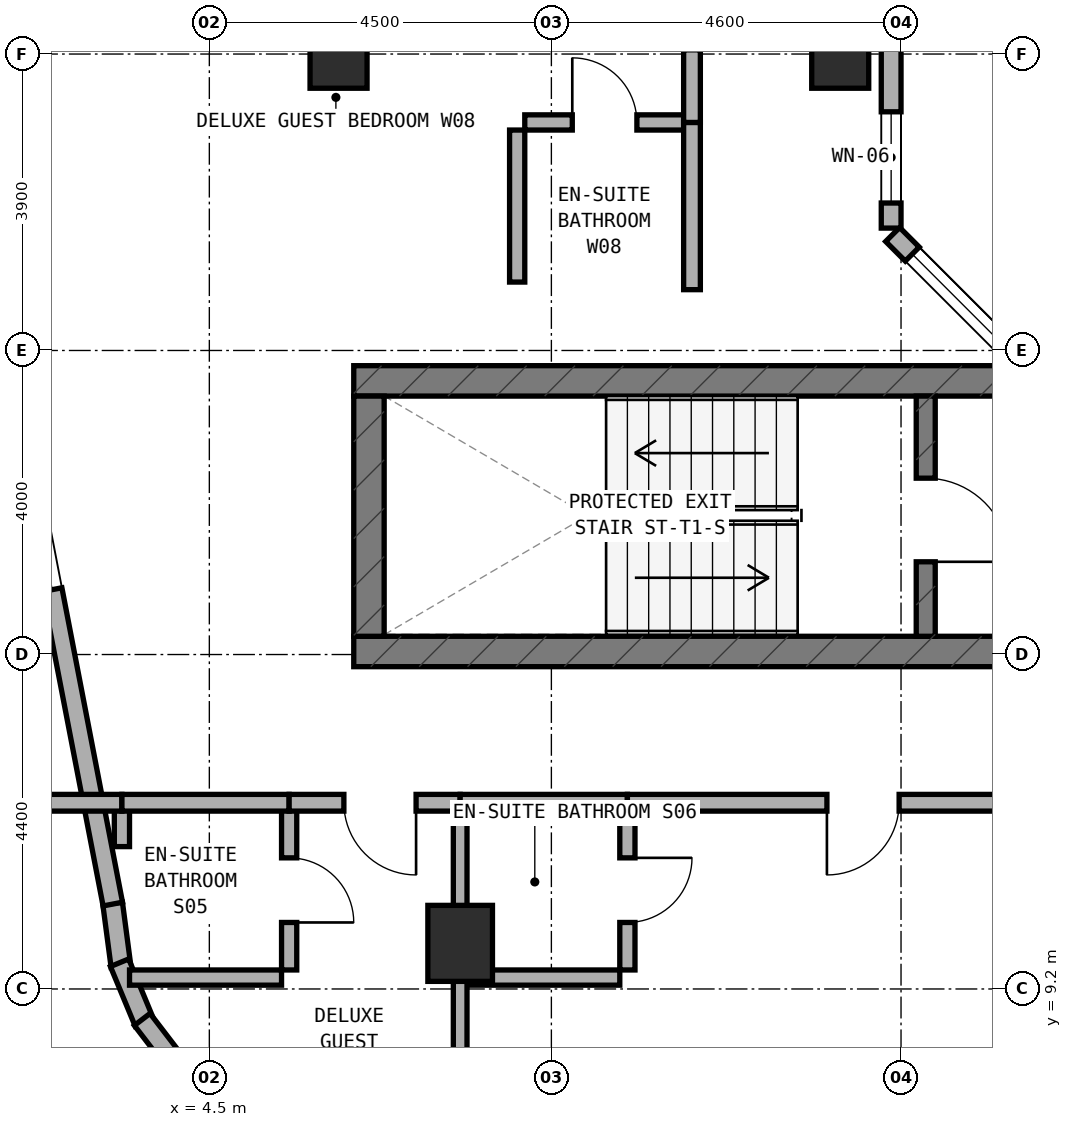
"""IFC4 building model, lengths in metres.
Left out: names, types, materials, properties, quantities, classifications, styles, units other than length and angle.
Written with IfcOpenShell. Run it as: python <this file> out.ifc"""

import sys

from ifc_helpers import new_model, si_unit, direction, frame, frame_2d, origin, origin_2d, place, context, subcontext, project, spatial, rectangle, extrude, element, fill, save


model = new_model("IFC4")
c1 = context("Model", 3, precision=1e-05, world=origin(), true_north=direction((0.0, 1.0)))
c2 = subcontext(c1, "Body", "Model", "MODEL_VIEW")
j1 = project(units=[si_unit("LENGTHUNIT", "METRE"), si_unit("PLANEANGLEUNIT", "RADIAN")], contexts=[c1])
p1 = place(None, origin())
s1 = spatial("IfcSite", under=j1, at=p1, CompositionType="ELEMENT")
p2 = place(p1, origin())
s2 = spatial("IfcBuilding", under=s1, at=p2, CompositionType="ELEMENT")
p3 = place(p2, frame((0.0, 0.0, 177.5)))
s3 = spatial("IfcBuildingStorey", under=s2, at=p3, CompositionType="ELEMENT", Elevation=177.5)
p4 = place(p3, frame((6.4, 13.64, 0.0), z_axis=(0.0, 0.0, 1.0), x_axis=(1.0, 0.0, 0.0)))
e1 = element("IfcWall", 1, at=p4, inside=s3, PredefinedType="SHEAR", context=c2, shape_type="SweptSolid", body=[
    extrude(rectangle(XDim=24.4, YDim=0.4, at=frame_2d((12.2, 0.0))), origin(), (0.0, 0.0, 1.0), 3.6),
])
p5 = place(p4, frame((9.15, 0.0, 0.0)))
e2 = element("IfcOpeningElement", 2, at=p5, cuts=e1, PredefinedType="OPENING", context=c2, shape_type="SweptSolid", body=[
    extrude(rectangle(XDim=1.2, YDim=2.15, at=frame_2d((0.6, 1.075))), frame((0.0, 0.21, 0.0), z_axis=(0.0, -1.0, 0.0), x_axis=(1.0, 0.0, 0.0)), (0.0, 0.0, 1.0), 0.42),
])
p6 = place(p4, frame((16.94, 0.0, 0.0)))
e3 = element("IfcOpeningElement", 3, at=p6, cuts=e1, PredefinedType="OPENING", context=c2, shape_type="SweptSolid", body=[
    extrude(rectangle(XDim=0.85, YDim=2.1, at=frame_2d((0.425, 1.05))), frame((0.0, 0.21, 0.0), z_axis=(0.0, -1.0, 0.0), x_axis=(1.0, 0.0, 0.0)), (0.0, 0.0, 1.0), 0.42),
])
p7 = place(p4, frame((18.783, 0.0, 0.0)))
e4 = element("IfcOpeningElement", 4, at=p7, cuts=e1, PredefinedType="OPENING", context=c2, shape_type="SweptSolid", body=[
    extrude(rectangle(XDim=1.1, YDim=2.15, at=frame_2d((0.55, 1.075))), frame((0.0, 0.21, 0.0), z_axis=(0.0, -1.0, 0.0), x_axis=(1.0, 0.0, 0.0)), (0.0, 0.0, 1.0), 0.42),
])
p8 = place(p4, frame((20.65, 0.0, 0.0)))
e5 = element("IfcOpeningElement", 5, at=p8, cuts=e1, PredefinedType="OPENING", context=c2, shape_type="SweptSolid", body=[
    extrude(rectangle(XDim=1.1, YDim=2.15, at=frame_2d((0.55, 1.075))), frame((0.0, 0.21, 0.0), z_axis=(0.0, -1.0, 0.0), x_axis=(1.0, 0.0, 0.0)), (0.0, 0.0, 1.0), 0.42),
])
p9 = place(p4, frame((22.517, 0.0, 0.0)))
e6 = element("IfcOpeningElement", 6, at=p9, cuts=e1, PredefinedType="OPENING", context=c2, shape_type="SweptSolid", body=[
    extrude(rectangle(XDim=1.1, YDim=2.15, at=frame_2d((0.55, 1.075))), frame((0.0, 0.21, 0.0), z_axis=(0.0, -1.0, 0.0), x_axis=(1.0, 0.0, 0.0)), (0.0, 0.0, 1.0), 0.42),
])
p10 = place(p3, frame((6.4, 17.2, 0.0), z_axis=(0.0, 0.0, 1.0), x_axis=(1.0, 0.0, 0.0)))
e7 = element("IfcWall", 7, at=p10, inside=s3, PredefinedType="SHEAR", context=c2, shape_type="SweptSolid", body=[
    extrude(rectangle(XDim=24.4, YDim=0.4, at=frame_2d((12.2, 0.0))), origin(), (0.0, 0.0, 1.0), 3.6),
])
p11 = place(p3, frame((6.6, 13.84, 0.0), z_axis=(0.0, 0.0, 1.0), x_axis=(0.0, 1.0, 0.0)))
e8 = element("IfcWall", 8, at=p11, inside=s3, PredefinedType="SHEAR", context=c2, shape_type="SweptSolid", body=[
    extrude(rectangle(XDim=3.16, YDim=0.4, at=frame_2d((1.58, 0.0))), origin(), (0.0, 0.0, 1.0), 3.6),
])
p12 = place(p3, frame((13.925, 13.84, 0.0), z_axis=(0.0, 0.0, 1.0), x_axis=(0.0, 1.0, 0.0)))
e9 = element("IfcWall", 9, at=p12, inside=s3, PredefinedType="STANDARD", context=c2, shape_type="SweptSolid", body=[
    extrude(rectangle(XDim=3.16, YDim=0.25, at=frame_2d((1.58, 0.0))), origin(), (0.0, 0.0, 1.0), 3.32),
])
p13 = place(p12, frame((0.98, 0.0, 0.0)))
e10 = element("IfcOpeningElement", 10, at=p13, cuts=e9, PredefinedType="OPENING", context=c2, shape_type="SweptSolid", body=[
    extrude(rectangle(XDim=1.1, YDim=2.15, at=frame_2d((0.55, 1.075))), frame((0.0, 0.135, 0.0), z_axis=(0.0, -1.0, 0.0), x_axis=(1.0, 0.0, 0.0)), (0.0, 0.0, 1.0), 0.27),
])
p14 = place(p3, frame((6.2, 21.5, 0.0), z_axis=(0.0, 0.0, 1.0), x_axis=(1.0, 0.0, 0.0)))
e11 = element("IfcColumn", 11, at=p14, inside=s3, PredefinedType="COLUMN", context=c2, shape_type="SweptSolid", body=[
    extrude(rectangle(XDim=0.75, YDim=0.9, at=origin_2d()), origin(), (0.0, 0.0, 1.0), 3.6),
])
p15 = place(p3, frame((7.8, 9.8, 0.0), z_axis=(0.0, 0.0, 1.0), x_axis=(1.0, 0.0, 0.0)))
e12 = element("IfcColumn", 12, at=p15, inside=s3, PredefinedType="COLUMN", context=c2, shape_type="SweptSolid", body=[
    extrude(rectangle(XDim=0.85, YDim=1.0, at=origin_2d()), origin(), (0.0, 0.0, 1.0), 3.6),
])
p16 = place(p3, frame((12.8, 21.5, 0.0), z_axis=(0.0, 0.0, 1.0), x_axis=(1.0, 0.0, 0.0)))
e13 = element("IfcColumn", 13, at=p16, inside=s3, PredefinedType="COLUMN", context=c2, shape_type="SweptSolid", body=[
    extrude(rectangle(XDim=0.75, YDim=0.9, at=origin_2d()), origin(), (0.0, 0.0, 1.0), 3.6),
])
p17 = place(p3, frame((3.228, 10.325, 0.0), z_axis=(0.0, 0.0, 1.0), x_axis=(0.130704676564, -0.99142134712, 0.0)))
e14 = element("IfcWall", 14, at=p17, inside=s3, PredefinedType="STANDARD", context=c2, shape_type="SweptSolid", body=[
    extrude(rectangle(XDim=0.833, YDim=0.26, at=frame_2d((0.417, 0.0))), origin(), (0.0, 0.0, 1.0), 3.32),
])
p18 = place(p3, frame((3.319, 9.545, 0.0), z_axis=(0.0, 0.0, 1.0), x_axis=(0.383086687796, -0.923712395518, 0.0)))
e15 = element("IfcWall", 15, at=p18, inside=s3, PredefinedType="STANDARD", context=c2, shape_type="SweptSolid", body=[
    extrude(rectangle(XDim=0.851, YDim=0.26, at=frame_2d((0.425, 0.0))), origin(), (0.0, 0.0, 1.0), 3.32),
])
p19 = place(p3, frame((3.617, 8.799, 0.0), z_axis=(0.0, 0.0, 1.0), x_axis=(0.608099977432, -0.793860452124, 0.0)))
e16 = element("IfcWall", 16, at=p19, inside=s3, PredefinedType="STANDARD", context=c2, shape_type="SweptSolid", body=[
    extrude(rectangle(XDim=0.85, YDim=0.26, at=frame_2d((0.425, 0.0))), origin(), (0.0, 0.0, 1.0), 3.32),
])
p20 = place(p3, frame((15.278, 17.338, 0.0), z_axis=(0.0, 0.0, 1.0), x_axis=(-0.707106781187, 0.707106781187, 0.0)))
e17 = element("IfcWall", 17, at=p20, inside=s3, PredefinedType="STANDARD", context=c2, shape_type="SweptSolid", body=[
    extrude(rectangle(XDim=2.529, YDim=0.26, at=frame_2d((1.264, 0.0))), origin(), (0.0, 0.0, 1.0), 3.32),
])
p21 = place(p20, frame((0.364, 0.0, 0.85)))
e18 = element("IfcOpeningElement", 18, at=p21, cuts=e17, PredefinedType="OPENING", context=c2, shape_type="SweptSolid", body=[
    extrude(rectangle(XDim=1.8, YDim=1.5, at=frame_2d((0.9, 0.75))), frame((0.0, 0.14, 0.0), z_axis=(0.0, -1.0, 0.0), x_axis=(1.0, 0.0, 0.0)), (0.0, 0.0, 1.0), 0.28),
])
p22 = place(p3, frame((13.47, 19.21, 0.0), z_axis=(0.0, 0.0, 1.0), x_axis=(0.0, 1.0, 0.0)))
e19 = element("IfcWall", 19, at=p22, inside=s3, PredefinedType="STANDARD", context=c2, shape_type="SweptSolid", body=[
    extrude(rectangle(XDim=11.615, YDim=0.26, at=frame_2d((5.808, 0.0))), origin(), (0.0, 0.0, 1.0), 3.32),
])
p23 = place(p22, frame((0.33, 0.0, 0.5)))
e20 = element("IfcOpeningElement", 20, at=p23, cuts=e19, PredefinedType="OPENING", context=c2, shape_type="SweptSolid", body=[
    extrude(rectangle(XDim=1.2, YDim=1.9, at=frame_2d((0.6, 0.95))), frame((0.0, 0.14, 0.0), z_axis=(0.0, -1.0, 0.0), x_axis=(1.0, 0.0, 0.0)), (0.0, 0.0, 1.0), 0.28),
])
p24 = place(p22, frame((4.74, 0.0, 0.85)))
e21 = element("IfcOpeningElement", 21, at=p24, cuts=e19, PredefinedType="OPENING", context=c2, shape_type="SweptSolid", body=[
    extrude(rectangle(XDim=2.1, YDim=1.5, at=frame_2d((1.05, 0.75))), frame((0.0, 0.14, 0.0), z_axis=(0.0, -1.0, 0.0), x_axis=(1.0, 0.0, 0.0)), (0.0, 0.0, 1.0), 0.28),
])
p25 = place(p22, frame((10.067, 0.0, 0.5)))
e22 = element("IfcOpeningElement", 22, at=p25, cuts=e19, PredefinedType="OPENING", context=c2, shape_type="SweptSolid", body=[
    extrude(rectangle(XDim=1.2, YDim=1.9, at=frame_2d((0.6, 0.95))), frame((0.0, 0.14, 0.0), z_axis=(0.0, -1.0, 0.0), x_axis=(1.0, 0.0, 0.0)), (0.0, 0.0, 1.0), 0.28),
])
p26 = place(p3, frame((1.518, 19.199, 0.0), z_axis=(0.0, 0.0, 1.0), x_axis=(0.189254809039, -0.98192801022, 0.0)))
e23 = element("IfcWall", 23, at=p26, inside=s3, PredefinedType="STANDARD", context=c2, shape_type="SweptSolid", body=[
    extrude(rectangle(XDim=9.046, YDim=0.26, at=frame_2d((4.523, 0.0))), origin(), (0.0, 0.0, 1.0), 3.32),
])
p27 = place(p26, frame((2.733, 0.0, 0.85)))
e24 = element("IfcOpeningElement", 24, at=p27, cuts=e23, PredefinedType="OPENING", context=c2, shape_type="SweptSolid", body=[
    extrude(rectangle(XDim=2.1, YDim=1.5, at=frame_2d((1.05, 0.75))), frame((0.0, 0.14, 0.0), z_axis=(0.0, -1.0, 0.0), x_axis=(1.0, 0.0, 0.0)), (0.0, 0.0, 1.0), 0.28),
])
p28 = place(p3, frame((5.55, 9.45, 0.0), z_axis=(0.0, 0.0, 1.0), x_axis=(0.0, 1.0, 0.0)))
e25 = element("IfcWall", 25, at=p28, inside=s3, PredefinedType="PLUMBINGWALL", context=c2, shape_type="SweptSolid", body=[
    extrude(rectangle(XDim=2.1, YDim=0.2, at=frame_2d((1.05, 0.0))), origin(), (0.0, 0.0, 1.0), 3.32),
])
p29 = place(p28, frame((0.625, 0.0, 0.0)))
e26 = element("IfcOpeningElement", 26, at=p29, cuts=e25, PredefinedType="OPENING", context=c2, shape_type="SweptSolid", body=[
    extrude(rectangle(XDim=0.85, YDim=2.1, at=frame_2d((0.425, 1.05))), frame((0.0, 0.11, 0.0), z_axis=(0.0, -1.0, 0.0), x_axis=(1.0, 0.0, 0.0)), (0.0, 0.0, 1.0), 0.22),
])
p30 = place(p3, frame((3.45, 9.35, 0.0), z_axis=(0.0, 0.0, 1.0), x_axis=(1.0, 0.0, 0.0)))
e27 = element("IfcWall", 27, at=p30, inside=s3, PredefinedType="PLUMBINGWALL", context=c2, shape_type="SweptSolid", body=[
    extrude(rectangle(XDim=2.0, YDim=0.2, at=frame_2d((1.0, 0.0))), origin(), (0.0, 0.0, 1.0), 3.32),
])
p31 = place(p3, frame((3.35, 11.073, 0.0), z_axis=(0.0, 0.0, 1.0), x_axis=(0.0, 1.0, 0.0)))
e28 = element("IfcWall", 28, at=p31, inside=s3, PredefinedType="PLUMBINGWALL", context=c2, shape_type="SweptSolid", body=[
    extrude(rectangle(XDim=0.577, YDim=0.2, at=frame_2d((0.289, 0.0))), origin(), (0.0, 0.0, 1.0), 3.32),
])
p32 = place(p3, frame((1.56, 11.65, 0.0), z_axis=(0.0, 0.0, 1.0), x_axis=(1.0, 0.0, 0.0)))
e29 = element("IfcWall", 29, at=p32, inside=s3, PredefinedType="SOLIDWALL", context=c2, shape_type="SweptSolid", body=[
    extrude(rectangle(XDim=1.79, YDim=0.22, at=frame_2d((0.895, 0.0))), origin(), (0.0, 0.0, 1.0), 3.32),
])
p33 = place(p3, frame((3.35, 11.65, 0.0), z_axis=(0.0, 0.0, 1.0), x_axis=(1.0, 0.0, 0.0)))
e30 = element("IfcWall", 30, at=p33, inside=s3, PredefinedType="SOLIDWALL", context=c2, shape_type="SweptSolid", body=[
    extrude(rectangle(XDim=2.2, YDim=0.22, at=frame_2d((1.1, 0.0))), origin(), (0.0, 0.0, 1.0), 3.32),
])
p34 = place(p3, frame((5.55, 11.65, 0.0), z_axis=(0.0, 0.0, 1.0), x_axis=(1.0, 0.0, 0.0)))
e31 = element("IfcWall", 31, at=p34, inside=s3, PredefinedType="SOLIDWALL", context=c2, shape_type="SweptSolid", body=[
    extrude(rectangle(XDim=2.25, YDim=0.22, at=frame_2d((1.125, 0.0))), origin(), (0.0, 0.0, 1.0), 2.995),
])
p35 = place(p34, frame((0.72, 0.0, 0.0)))
e32 = element("IfcOpeningElement", 32, at=p35, cuts=e31, PredefinedType="OPENING", context=c2, shape_type="SweptSolid", body=[
    extrude(rectangle(XDim=0.95, YDim=2.1, at=frame_2d((0.475, 1.05))), frame((0.0, 0.12, 0.0), z_axis=(0.0, -1.0, 0.0), x_axis=(1.0, 0.0, 0.0)), (0.0, 0.0, 1.0), 0.24),
])
p36 = place(p3, frame((7.8, 6.872, 0.0), z_axis=(0.0, 0.0, 1.0), x_axis=(0.0, 1.0, 0.0)))
e33 = element("IfcWall", 33, at=p36, inside=s3, PredefinedType="SOLIDWALL", context=c2, shape_type="SweptSolid", body=[
    extrude(rectangle(XDim=4.778, YDim=0.18, at=frame_2d((2.389, 0.0))), origin(), (0.0, 0.0, 1.0), 2.935),
])
p37 = place(p3, frame((10.0, 9.45, 0.0), z_axis=(0.0, 0.0, 1.0), x_axis=(0.0, 1.0, 0.0)))
e34 = element("IfcWall", 34, at=p37, inside=s3, PredefinedType="PLUMBINGWALL", context=c2, shape_type="SweptSolid", body=[
    extrude(rectangle(XDim=2.1, YDim=0.2, at=frame_2d((1.05, 0.0))), origin(), (0.0, 0.0, 1.0), 2.845),
])
p38 = place(p37, frame((0.625, 0.0, 0.0)))
e35 = element("IfcOpeningElement", 35, at=p38, cuts=e34, PredefinedType="OPENING", context=c2, shape_type="SweptSolid", body=[
    extrude(rectangle(XDim=0.85, YDim=2.1, at=frame_2d((0.425, 1.05))), frame((0.0, 0.11, 0.0), z_axis=(0.0, -1.0, 0.0), x_axis=(1.0, 0.0, 0.0)), (0.0, 0.0, 1.0), 0.22),
])
p39 = place(p3, frame((7.9, 9.35, 0.0), z_axis=(0.0, 0.0, 1.0), x_axis=(1.0, 0.0, 0.0)))
e36 = element("IfcWall", 36, at=p39, inside=s3, PredefinedType="PLUMBINGWALL", context=c2, shape_type="SweptSolid", body=[
    extrude(rectangle(XDim=2.0, YDim=0.2, at=frame_2d((1.0, 0.0))), origin(), (0.0, 0.0, 1.0), 3.32),
])
p40 = place(p3, frame((7.8, 11.65, 0.0), z_axis=(0.0, 0.0, 1.0), x_axis=(1.0, 0.0, 0.0)))
e37 = element("IfcWall", 37, at=p40, inside=s3, PredefinedType="SOLIDWALL", context=c2, shape_type="SweptSolid", body=[
    extrude(rectangle(XDim=2.2, YDim=0.22, at=frame_2d((1.1, 0.0))), origin(), (0.0, 0.0, 1.0), 2.995),
])
p41 = place(p3, frame((10.0, 11.65, 0.0), z_axis=(0.0, 0.0, 1.0), x_axis=(1.0, 0.0, 0.0)))
e38 = element("IfcWall", 38, at=p41, inside=s3, PredefinedType="SOLIDWALL", context=c2, shape_type="SweptSolid", body=[
    extrude(rectangle(XDim=6.2, YDim=0.22, at=frame_2d((3.1, 0.0))), origin(), (0.0, 0.0, 1.0), 2.995),
])
p42 = place(p41, frame((2.625, 0.0, 0.0)))
e39 = element("IfcOpeningElement", 39, at=p42, cuts=e38, PredefinedType="OPENING", context=c2, shape_type="SweptSolid", body=[
    extrude(rectangle(XDim=0.95, YDim=2.1, at=frame_2d((0.475, 1.05))), frame((0.0, 0.12, 0.0), z_axis=(0.0, -1.0, 0.0), x_axis=(1.0, 0.0, 0.0)), (0.0, 0.0, 1.0), 0.24),
])
p43 = place(p3, frame((8.65, 20.6, 0.0), z_axis=(0.0, 0.0, 1.0), x_axis=(1.0, 0.0, 0.0)))
e40 = element("IfcWall", 40, at=p43, inside=s3, PredefinedType="PLUMBINGWALL", context=c2, shape_type="SweptSolid", body=[
    extrude(rectangle(XDim=2.1, YDim=0.2, at=frame_2d((1.05, 0.0))), origin(), (0.0, 0.0, 1.0), 3.32),
])
p44 = place(p43, frame((0.625, 0.0, 0.0)))
e41 = element("IfcOpeningElement", 41, at=p44, cuts=e40, PredefinedType="OPENING", context=c2, shape_type="SweptSolid", body=[
    extrude(rectangle(XDim=0.85, YDim=2.1, at=frame_2d((0.425, 1.05))), frame((0.0, 0.11, 0.0), z_axis=(0.0, -1.0, 0.0), x_axis=(1.0, 0.0, 0.0)), (0.0, 0.0, 1.0), 0.22),
])
p45 = place(p3, frame((8.55, 18.5, 0.0), z_axis=(0.0, 0.0, 1.0), x_axis=(0.0, 1.0, 0.0)))
e42 = element("IfcWall", 42, at=p45, inside=s3, PredefinedType="PLUMBINGWALL", context=c2, shape_type="SweptSolid", body=[
    extrude(rectangle(XDim=2.0, YDim=0.2, at=frame_2d((1.0, 0.0))), origin(), (0.0, 0.0, 1.0), 3.32),
])
p46 = place(p3, frame((10.85, 18.4, 0.0), z_axis=(0.0, 0.0, 1.0), x_axis=(0.0, 1.0, 0.0)))
e43 = element("IfcWall", 43, at=p46, inside=s3, PredefinedType="SOLIDWALL", context=c2, shape_type="SweptSolid", body=[
    extrude(rectangle(XDim=2.2, YDim=0.22, at=frame_2d((1.1, 0.0))), origin(), (0.0, 0.0, 1.0), 3.32),
])
p47 = place(p3, frame((10.85, 20.6, 0.0), z_axis=(0.0, 0.0, 1.0), x_axis=(0.0, 1.0, 0.0)))
e44 = element("IfcWall", 44, at=p47, inside=s3, PredefinedType="SOLIDWALL", context=c2, shape_type="SweptSolid", body=[
    extrude(rectangle(XDim=2.86, YDim=0.22, at=frame_2d((1.43, 0.0))), origin(), (0.0, 0.0, 1.0), 2.995),
])
p48 = place(p47, frame((0.955, 0.0, 0.0)))
e45 = element("IfcOpeningElement", 45, at=p48, cuts=e44, PredefinedType="OPENING", context=c2, shape_type="SweptSolid", body=[
    extrude(rectangle(XDim=0.95, YDim=2.1, at=frame_2d((0.475, 1.05))), frame((0.0, 0.12, 0.0), z_axis=(0.0, -1.0, 0.0), x_axis=(1.0, 0.0, 0.0)), (0.0, 0.0, 1.0), 0.24),
])
p49 = place(p21, origin())
e46 = element("IfcWindow", 46, at=p49, inside=s3, PartitioningType="SINGLE_PANEL", PredefinedType="WINDOW", context=c2, shape_type="SweptSolid", body=[
    extrude(rectangle(XDim=1.8, YDim=1.5, at=frame_2d((0.9, 0.75))), frame((0.0, 0.03, 0.0), z_axis=(0.0, -1.0, 0.0), x_axis=(1.0, 0.0, 0.0)), (0.0, 0.0, 1.0), 0.06),
])
fill(e18, e46)
p50 = place(p23, origin())
e47 = element("IfcWindow", 47, at=p50, inside=s3, PartitioningType="SINGLE_PANEL", PredefinedType="WINDOW", context=c2, shape_type="SweptSolid", body=[
    extrude(rectangle(XDim=1.2, YDim=1.9, at=frame_2d((0.6, 0.95))), frame((0.0, 0.03, 0.0), z_axis=(0.0, -1.0, 0.0), x_axis=(1.0, 0.0, 0.0)), (0.0, 0.0, 1.0), 0.06),
])
fill(e20, e47)
p51 = place(p27, origin())
e48 = element("IfcWindow", 48, at=p51, inside=s3, PartitioningType="SINGLE_PANEL", PredefinedType="WINDOW", context=c2, shape_type="SweptSolid", body=[
    extrude(rectangle(XDim=2.1, YDim=1.5, at=frame_2d((1.05, 0.75))), frame((0.0, 0.03, 0.0), z_axis=(0.0, -1.0, 0.0), x_axis=(1.0, 0.0, 0.0)), (0.0, 0.0, 1.0), 0.06),
])
fill(e24, e48)
p52 = place(p13, frame((1.1, 0.0, 0.0), z_axis=(0.0, 0.0, 1.0), x_axis=(-1.0, 0.0, 0.0)))
e49 = element("IfcDoor", 49, at=p52, inside=s3, OperationType="SINGLE_SWING_RIGHT", PredefinedType="DOOR", context=c2, shape_type="SweptSolid", body=[
    extrude(rectangle(XDim=1.1, YDim=2.15, at=frame_2d((0.55, 1.075))), frame((0.0, 0.025, 0.0), z_axis=(0.0, -1.0, 0.0), x_axis=(1.0, 0.0, 0.0)), (0.0, 0.0, 1.0), 0.05),
])
fill(e10, e49)
p53 = place(p29, frame((0.85, 0.0, 0.0), z_axis=(0.0, 0.0, 1.0), x_axis=(-1.0, 0.0, 0.0)))
e50 = element("IfcDoor", 50, at=p53, inside=s3, OperationType="SINGLE_SWING_RIGHT", PredefinedType="DOOR", context=c2, shape_type="SweptSolid", body=[
    extrude(rectangle(XDim=0.85, YDim=2.1, at=frame_2d((0.425, 1.05))), frame((0.0, 0.025, 0.0), z_axis=(0.0, -1.0, 0.0), x_axis=(1.0, 0.0, 0.0)), (0.0, 0.0, 1.0), 0.05),
])
fill(e26, e50)
p54 = place(p35, frame((0.95, 0.0, 0.0), z_axis=(0.0, 0.0, 1.0), x_axis=(-1.0, 0.0, 0.0)))
e51 = element("IfcDoor", 51, at=p54, inside=s3, OperationType="SINGLE_SWING_LEFT", PredefinedType="DOOR", context=c2, shape_type="SweptSolid", body=[
    extrude(rectangle(XDim=0.95, YDim=2.1, at=frame_2d((0.475, 1.05))), frame((0.0, 0.025, 0.0), z_axis=(0.0, -1.0, 0.0), x_axis=(1.0, 0.0, 0.0)), (0.0, 0.0, 1.0), 0.05),
])
fill(e32, e51)
p55 = place(p38, frame((0.85, 0.0, 0.0), z_axis=(0.0, 0.0, 1.0), x_axis=(-1.0, 0.0, 0.0)))
e52 = element("IfcDoor", 52, at=p55, inside=s3, OperationType="SINGLE_SWING_LEFT", PredefinedType="DOOR", context=c2, shape_type="SweptSolid", body=[
    extrude(rectangle(XDim=0.85, YDim=2.1, at=frame_2d((0.425, 1.05))), frame((0.0, 0.025, 0.0), z_axis=(0.0, -1.0, 0.0), x_axis=(1.0, 0.0, 0.0)), (0.0, 0.0, 1.0), 0.05),
])
fill(e35, e52)
p56 = place(p42, frame((0.95, 0.0, 0.0), z_axis=(0.0, 0.0, 1.0), x_axis=(-1.0, 0.0, 0.0)))
e53 = element("IfcDoor", 53, at=p56, inside=s3, OperationType="SINGLE_SWING_RIGHT", PredefinedType="DOOR", context=c2, shape_type="SweptSolid", body=[
    extrude(rectangle(XDim=0.95, YDim=2.1, at=frame_2d((0.475, 1.05))), frame((0.0, 0.025, 0.0), z_axis=(0.0, -1.0, 0.0), x_axis=(1.0, 0.0, 0.0)), (0.0, 0.0, 1.0), 0.05),
])
fill(e39, e53)
p57 = place(p44, origin())
e54 = element("IfcDoor", 54, at=p57, inside=s3, OperationType="SINGLE_SWING_LEFT", PredefinedType="DOOR", context=c2, shape_type="SweptSolid", body=[
    extrude(rectangle(XDim=0.85, YDim=2.1, at=frame_2d((0.425, 1.05))), frame((0.0, 0.025, 0.0), z_axis=(0.0, -1.0, 0.0), x_axis=(1.0, 0.0, 0.0)), (0.0, 0.0, 1.0), 0.05),
])
fill(e41, e54)
save(model, sys.argv[1])
